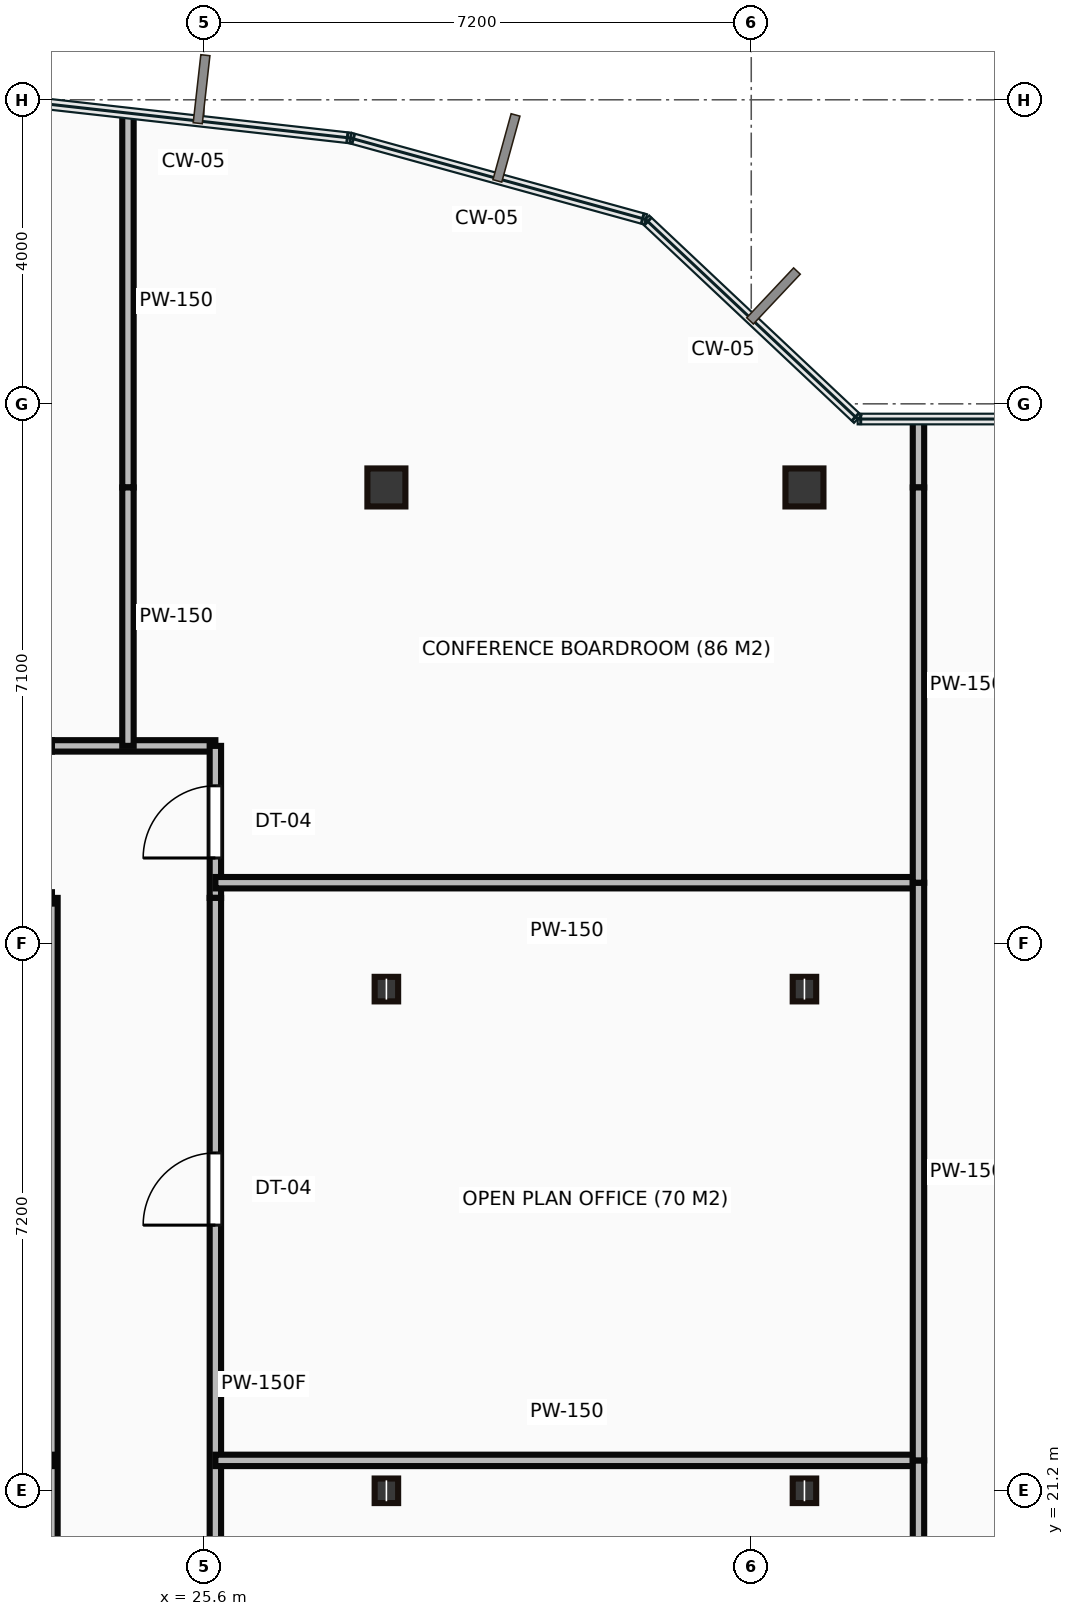
"""IFC4 building model, lengths in metres.
Left out: names, types, materials, properties, quantities, classifications, styles, units other than length and angle.
Written with IfcOpenShell. Run it as: python <this file> out.ifc"""

import sys

from ifc_helpers import new_model, si_unit, direction, frame, frame_2d, origin, origin_2d, place, context, subcontext, project, spatial, rectangle, hollow_rectangle, i_section, extrude, source, transform, mapped, element, fill, save


model = new_model("IFC4")
c1 = context("Model", 3, precision=1e-05, world=origin(), true_north=direction((0.0, 1.0)))
c2 = subcontext(c1, "Body", "Model", "MODEL_VIEW")
j1 = project(units=[si_unit("LENGTHUNIT", "METRE"), si_unit("PLANEANGLEUNIT", "RADIAN")], contexts=[c1])
p1 = place(None, origin())
s1 = spatial("IfcSite", under=j1, at=p1, CompositionType="ELEMENT")
p2 = place(p1, origin())
s2 = spatial("IfcBuilding", under=s1, at=p2, CompositionType="ELEMENT")
p3 = place(p2, frame((0.0, 0.0, 277.05)))
s3 = spatial("IfcBuildingStorey", under=s2, at=p3, CompositionType="ELEMENT", Elevation=277.05)
m1 = source(origin(), c2, "Body", "SweptSolid", [
    extrude(i_section(OverallWidth=0.309, OverallDepth=0.323, WebThickness=0.014, FlangeThickness=0.023, at=origin_2d()), origin(), (0.0, 0.0, 1.0), 3.65),
])
for number, where, z_axis, x_axis in (
    (1, (28.0, 21.2, 0.0), (0.0, 0.0, 1.0), (1.0, 0.0, 0.0)),
    (2, (28.0, 27.8, 0.0), (0.0, 0.0, 1.0), (1.0, 0.0, 0.0)),
):
    element("IfcColumn", number, at=place(p3, frame(where, z_axis=z_axis, x_axis=x_axis)), inside=s3, PredefinedType="COLUMN", context=c2, shape_type="MappedRepresentation", body=[
        mapped(m1, transform((0.0, 0.0, 0.0))),
    ])
m2 = source(origin(), c2, "Body", "SweptSolid", [
    extrude(hollow_rectangle(XDim=0.5, YDim=0.5, WallThickness=0.022, at=origin_2d()), origin(), (0.0, 0.0, 1.0), 3.65),
])
p4 = place(p3, frame((28.0, 34.4, 0.0), z_axis=(0.0, 0.0, 1.0), x_axis=(1.0, 0.0, 0.0)))
e3 = element("IfcColumn", 3, at=p4, inside=s3, PredefinedType="COLUMN", context=c2, shape_type="MappedRepresentation", body=[
    mapped(m2, transform((0.0, 0.0, 0.0))),
])
for number, where, z_axis, x_axis in (
    (4, (33.5, 21.2, 0.0), (0.0, 0.0, 1.0), (1.0, 0.0, 0.0)),
    (5, (33.5, 27.8, 0.0), (0.0, 0.0, 1.0), (1.0, 0.0, 0.0)),
):
    element("IfcColumn", number, at=place(p3, frame(where, z_axis=z_axis, x_axis=x_axis)), inside=s3, PredefinedType="COLUMN", context=c2, shape_type="MappedRepresentation", body=[
        mapped(m1, transform((0.0, 0.0, 0.0))),
    ])
p5 = place(p3, frame((33.5, 34.4, 0.0), z_axis=(0.0, 0.0, 1.0), x_axis=(1.0, 0.0, 0.0)))
e6 = element("IfcColumn", 6, at=p5, inside=s3, PredefinedType="COLUMN", context=c2, shape_type="MappedRepresentation", body=[
    mapped(m2, transform((0.0, 0.0, 0.0))),
])
m3 = source(origin(), c2, "Body", "SweptSolid", [
    extrude(rectangle(XDim=11.65, YDim=0.15, at=frame_2d((5.825, 0.0))), origin(), (0.0, 0.0, 1.0), 3.4),
])
p6 = place(p3, frame((11.95, 31.0, 0.0), z_axis=(0.0, 0.0, 1.0), x_axis=(1.0, 0.0, 0.0)))
e7 = element("IfcWall", 7, at=p6, inside=s3, PredefinedType="PARTITIONING", context=c2, shape_type="MappedRepresentation", body=[
    mapped(m3, transform((0.0, 0.0, 0.0))),
])
p7 = place(p6, frame((5.35, 0.0, 0.0)))
e8 = element("IfcOpeningElement", 8, at=p7, cuts=e7, PredefinedType="OPENING", context=c2, shape_type="SweptSolid", body=[
    extrude(rectangle(XDim=0.95, YDim=2.15, at=frame_2d((0.475, 1.075))), frame((0.0, 0.085, 0.0), z_axis=(0.0, -1.0, 0.0), x_axis=(1.0, 0.0, 0.0)), (0.0, 0.0, 1.0), 0.17),
])
m4 = source(origin(), c2, "Body", "SweptSolid", [
    extrude(rectangle(XDim=2.15, YDim=0.15, at=frame_2d((1.075, 0.0))), origin(), (0.0, 0.0, 1.0), 3.4),
])
p8 = place(p3, frame((23.6, 31.0, 0.0), z_axis=(0.0, 0.0, 1.0), x_axis=(1.0, 0.0, 0.0)))
e9 = element("IfcWall", 9, at=p8, inside=s3, PredefinedType="PARTITIONING", context=c2, shape_type="MappedRepresentation", body=[
    mapped(m4, transform((0.0, 0.0, 0.0))),
])
m5 = source(origin(), c2, "Body", "SweptSolid", [
    extrude(rectangle(XDim=2.0, YDim=0.15, at=frame_2d((1.0, 0.0))), origin(), (0.0, 0.0, 1.0), 3.4),
])
p9 = place(p3, frame((25.75, 31.0, 0.0), z_axis=(0.0, 0.0, 1.0), x_axis=(0.0, -1.0, 0.0)))
e10 = element("IfcWall", 10, at=p9, inside=s3, PredefinedType="PARTITIONING", context=c2, shape_type="MappedRepresentation", body=[
    mapped(m5, transform((0.0, 0.0, 0.0))),
])
p10 = place(p9, frame((0.525, 0.0, 0.0)))
e11 = element("IfcOpeningElement", 11, at=p10, cuts=e10, PredefinedType="OPENING", context=c2, shape_type="SweptSolid", body=[
    extrude(rectangle(XDim=0.95, YDim=2.15, at=frame_2d((0.475, 1.075))), frame((0.0, 0.085, 0.0), z_axis=(0.0, -1.0, 0.0), x_axis=(1.0, 0.0, 0.0)), (0.0, 0.0, 1.0), 0.17),
])
m6 = source(origin(), c2, "Body", "SweptSolid", [
    extrude(rectangle(XDim=12.8, YDim=0.15, at=frame_2d((6.4, 0.0))), origin(), (0.0, 0.0, 1.0), 3.4),
])
p11 = place(p3, frame((25.75, 29.0, 0.0), z_axis=(0.0, 0.0, 1.0), x_axis=(0.0, -1.0, 0.0)))
e12 = element("IfcWall", 12, at=p11, inside=s3, PredefinedType="PARTITIONING", context=c2, shape_type="MappedRepresentation", body=[
    mapped(m6, transform((0.0, 0.0, 0.0))),
])
p12 = place(p11, frame((3.355, 0.0, 0.0)))
e13 = element("IfcOpeningElement", 13, at=p12, cuts=e12, PredefinedType="OPENING", context=c2, shape_type="SweptSolid", body=[
    extrude(rectangle(XDim=0.95, YDim=2.15, at=frame_2d((0.475, 1.075))), frame((0.0, 0.085, 0.0), z_axis=(0.0, -1.0, 0.0), x_axis=(1.0, 0.0, 0.0)), (0.0, 0.0, 1.0), 0.17),
])
p13 = place(p3, frame((23.6, 16.2, 0.0), z_axis=(0.0, 0.0, 1.0), x_axis=(0.0, 1.0, 0.0)))
e14 = element("IfcWall", 14, at=p13, inside=s3, PredefinedType="PARTITIONING", context=c2, shape_type="MappedRepresentation", body=[
    mapped(m6, transform((0.0, 0.0, 0.0))),
])
m7 = source(origin(), c2, "Body", "SweptSolid", [
    extrude(rectangle(XDim=4.905, YDim=0.15, at=frame_2d((2.453, 0.0))), origin(), (0.0, 0.0, 1.0), 3.4),
])
p14 = place(p3, frame((24.6, 39.305, 0.0), z_axis=(0.0, 0.0, 1.0), x_axis=(0.0, -1.0, 0.0)))
e15 = element("IfcWall", 15, at=p14, inside=s3, PredefinedType="PARTITIONING", context=c2, shape_type="MappedRepresentation", body=[
    mapped(m7, transform((0.0, 0.0, 0.0))),
])
m8 = source(origin(), c2, "Body", "SweptSolid", [
    extrude(rectangle(XDim=3.4, YDim=0.15, at=frame_2d((1.7, 0.0))), origin(), (0.0, 0.0, 1.0), 3.4),
])
p15 = place(p3, frame((24.6, 34.4, 0.0), z_axis=(0.0, 0.0, 1.0), x_axis=(0.0, -1.0, 0.0)))
e16 = element("IfcWall", 16, at=p15, inside=s3, PredefinedType="PARTITIONING", context=c2, shape_type="MappedRepresentation", body=[
    mapped(m8, transform((0.0, 0.0, 0.0))),
])
m9 = source(origin(), c2, "Body", "SweptSolid", [
    extrude(rectangle(XDim=9.25, YDim=0.15, at=frame_2d((4.625, 0.0))), origin(), (0.0, 0.0, 1.0), 3.4),
])
for number, where, z_axis, x_axis in (
    (17, (25.75, 21.6, 0.0), (0.0, 0.0, 1.0), (1.0, 0.0, 0.0)),
    (18, (35.0, 29.2, 0.0), (0.0, 0.0, 1.0), (-1.0, 0.0, 0.0)),
):
    element("IfcWall", number, at=place(p3, frame(where, z_axis=z_axis, x_axis=x_axis)), inside=s3, PredefinedType="PARTITIONING", context=c2, shape_type="MappedRepresentation", body=[
        mapped(m9, transform((0.0, 0.0, 0.0))),
    ])
m10 = source(origin(), c2, "Body", "SweptSolid", [
    extrude(rectangle(XDim=5.4, YDim=0.15, at=frame_2d((2.7, 0.0))), origin(), (0.0, 0.0, 1.0), 3.4),
])
p16 = place(p3, frame((35.0, 21.6, 0.0), z_axis=(0.0, 0.0, 1.0), x_axis=(0.0, -1.0, 0.0)))
e19 = element("IfcWall", 19, at=p16, inside=s3, PredefinedType="PARTITIONING", context=c2, shape_type="MappedRepresentation", body=[
    mapped(m10, transform((0.0, 0.0, 0.0))),
])
m11 = source(origin(), c2, "Body", "SweptSolid", [
    extrude(rectangle(XDim=7.6, YDim=0.15, at=frame_2d((3.8, 0.0))), origin(), (0.0, 0.0, 1.0), 3.4),
])
p17 = place(p3, frame((35.0, 29.2, 0.0), z_axis=(0.0, 0.0, 1.0), x_axis=(0.0, -1.0, 0.0)))
e20 = element("IfcWall", 20, at=p17, inside=s3, PredefinedType="PARTITIONING", context=c2, shape_type="MappedRepresentation", body=[
    mapped(m11, transform((0.0, 0.0, 0.0))),
])
m12 = source(origin(), c2, "Body", "SweptSolid", [
    extrude(rectangle(XDim=0.88, YDim=0.15, at=frame_2d((0.44, 0.0))), origin(), (0.0, 0.0, 1.0), 3.4),
])
p18 = place(p3, frame((35.0, 35.28, 0.0), z_axis=(0.0, 0.0, 1.0), x_axis=(0.0, -1.0, 0.0)))
e21 = element("IfcWall", 21, at=p18, inside=s3, PredefinedType="PARTITIONING", context=c2, shape_type="MappedRepresentation", body=[
    mapped(m12, transform((0.0, 0.0, 0.0))),
])
m13 = source(origin(), c2, "Body", "SweptSolid", [
    extrude(rectangle(XDim=5.2, YDim=0.15, at=frame_2d((2.6, 0.0))), origin(), (0.0, 0.0, 1.0), 3.4),
])
p19 = place(p3, frame((35.0, 34.4, 0.0), z_axis=(0.0, 0.0, 1.0), x_axis=(0.0, -1.0, 0.0)))
e22 = element("IfcWall", 22, at=p19, inside=s3, PredefinedType="PARTITIONING", context=c2, shape_type="MappedRepresentation", body=[
    mapped(m13, transform((0.0, 0.0, 0.0))),
])
m14 = source(origin(), c2, "Body", "SweptSolid", [
    extrude(rectangle(XDim=0.95, YDim=2.15, at=frame_2d((0.475, 1.075))), frame((0.0, 0.025, 0.0), z_axis=(0.0, -1.0, 0.0), x_axis=(1.0, 0.0, 0.0)), (0.0, 0.0, 1.0), 0.05),
])
p20 = place(p10, origin())
e23 = element("IfcDoor", 23, at=p20, inside=s3, OperationType="SINGLE_SWING_RIGHT", PredefinedType="DOOR", context=c2, shape_type="MappedRepresentation", body=[
    mapped(m14, transform((0.0, 0.0, 0.0))),
])
fill(e11, e23)
p21 = place(p12, origin())
e24 = element("IfcDoor", 24, at=p21, inside=s3, OperationType="SINGLE_SWING_RIGHT", PredefinedType="DOOR", context=c2, shape_type="MappedRepresentation", body=[
    mapped(m14, transform((0.0, 0.0, 0.0))),
])
fill(e13, e24)
save(model, sys.argv[1])
